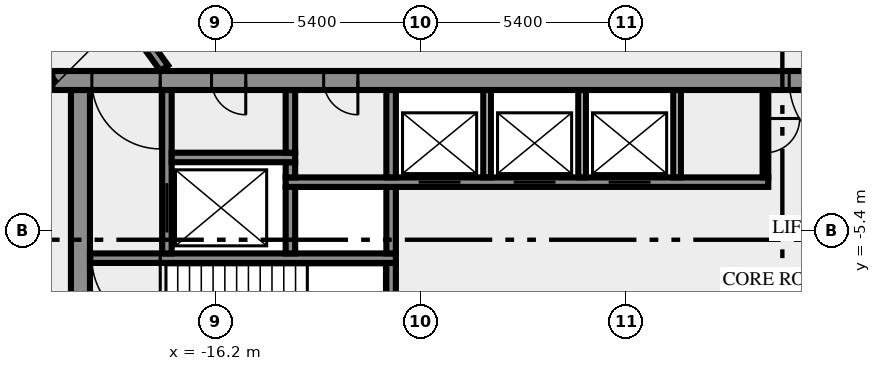
"""IFC4 building model, lengths in metres.
Left out: names, types, materials, properties, quantities, classifications, styles, units other than length and angle.
Written with IfcOpenShell. Run it as: python <this file> out.ifc"""

import sys

from ifc_helpers import new_model, si_unit, direction, frame, frame_2d, origin, place, context, subcontext, project, spatial, rectangle, extrude, element, fill, save


model = new_model("IFC4")
c1 = context("Model", 3, precision=1e-05, world=origin(), true_north=direction((0.0, 1.0)))
c2 = subcontext(c1, "Body", "Model", "MODEL_VIEW")
j1 = project(units=[si_unit("LENGTHUNIT", "METRE"), si_unit("PLANEANGLEUNIT", "RADIAN")], contexts=[c1])
p1 = place(None, origin())
s1 = spatial("IfcSite", under=j1, at=p1, CompositionType="ELEMENT")
p2 = place(p1, origin())
s2 = spatial("IfcBuilding", under=s1, at=p2, CompositionType="ELEMENT")
p3 = place(p2, frame((0.0, 0.0, 51.0)))
s3 = spatial("IfcBuildingStorey", under=s2, at=p3, CompositionType="ELEMENT", Elevation=51.0)
p4 = place(p3, frame((-19.75, -10.5, 0.0), z_axis=(0.0, 0.0, 1.0), x_axis=(0.0, 1.0, 0.0)))
e1 = element("IfcWall", 1, at=p4, inside=s3, PredefinedType="SHEAR", context=c2, shape_type="SweptSolid", body=[
    extrude(rectangle(XDim=8.8, YDim=0.5, at=frame_2d((4.4, 0.0))), origin(), (0.0, 0.0, 1.0), 3.65),
])
p5 = place(p3, frame((-11.575, -7.25, 0.0), z_axis=(0.0, 0.0, 1.0), x_axis=(0.0, 1.0, 0.0)))
e2 = element("IfcWall", 2, at=p5, inside=s3, PredefinedType="SHEAR", context=c2, shape_type="SweptSolid", body=[
    extrude(rectangle(XDim=1.0, YDim=0.25, at=frame_2d((0.5, 0.0))), origin(), (0.0, 0.0, 1.0), 3.65),
])
p6 = place(p3, frame((-11.45, -6.125, 0.0), z_axis=(0.0, 0.0, 1.0), x_axis=(-1.0, 0.0, 0.0)))
e3 = element("IfcWall", 3, at=p6, inside=s3, PredefinedType="SHEAR", context=c2, shape_type="SweptSolid", body=[
    extrude(rectangle(XDim=8.05, YDim=0.25, at=frame_2d((4.025, 0.0))), origin(), (0.0, 0.0, 1.0), 3.65),
])
p7 = place(p6, frame((6.2, 0.0, 0.0)))
e4 = element("IfcOpeningElement", 4, at=p7, cuts=e3, PredefinedType="OPENING", context=c2, shape_type="SweptSolid", body=[
    extrude(rectangle(XDim=1.8, YDim=2.1, at=frame_2d((0.9, 1.05))), frame((0.0, 0.135, 0.0), z_axis=(0.0, -1.0, 0.0), x_axis=(1.0, 0.0, 0.0)), (0.0, 0.0, 1.0), 0.27),
])
p8 = place(p3, frame((-17.475, -6.0, 0.0), z_axis=(0.0, 0.0, 1.0), x_axis=(0.0, 1.0, 0.0)))
e5 = element("IfcWall", 5, at=p8, inside=s3, PredefinedType="SHEAR", context=c2, shape_type="SweptSolid", body=[
    extrude(rectangle(XDim=4.3, YDim=0.25, at=frame_2d((2.15, 0.0))), origin(), (0.0, 0.0, 1.0), 3.65),
])
p9 = place(p8, frame((0.55, 0.0, 0.0)))
e6 = element("IfcOpeningElement", 6, at=p9, cuts=e5, PredefinedType="OPENING", context=c2, shape_type="SweptSolid", body=[
    extrude(rectangle(XDim=1.3, YDim=2.1, at=frame_2d((0.65, 1.05))), frame((0.0, 0.135, 0.0), z_axis=(0.0, -1.0, 0.0), x_axis=(1.0, 0.0, 0.0)), (0.0, 0.0, 1.0), 0.27),
])
for number, where, z_axis, x_axis in (
    (7, (-14.225, -6.0, 0.0), (0.0, 0.0, 1.0), (0.0, 1.0, 0.0)),
    (8, (-11.575, -6.0, 0.0), (0.0, 0.0, 1.0), (0.0, 1.0, 0.0)),
):
    element("IfcWall", number, at=place(p3, frame(where, z_axis=z_axis, x_axis=x_axis)), inside=s3, PredefinedType="SHEAR", context=c2, shape_type="SweptSolid", body=[
        extrude(rectangle(XDim=1.75, YDim=0.25, at=frame_2d((0.875, 0.0))), origin(), (0.0, 0.0, 1.0), 3.65),
    ])
p10 = place(p3, frame((-14.35, -4.125, 0.0), z_axis=(0.0, 0.0, 1.0), x_axis=(1.0, 0.0, 0.0)))
e9 = element("IfcWall", 9, at=p10, inside=s3, PredefinedType="SHEAR", context=c2, shape_type="SweptSolid", body=[
    extrude(rectangle(XDim=12.7, YDim=0.25, at=frame_2d((6.35, 0.0))), origin(), (0.0, 0.0, 1.0), 3.65),
])
p11 = place(p10, frame((3.5, 0.0, 0.0)))
e10 = element("IfcOpeningElement", 10, at=p11, cuts=e9, PredefinedType="OPENING", context=c2, shape_type="SweptSolid", body=[
    extrude(rectangle(XDim=1.1, YDim=2.1, at=frame_2d((0.55, 1.05))), frame((0.0, 0.135, 0.0), z_axis=(0.0, -1.0, 0.0), x_axis=(1.0, 0.0, 0.0)), (0.0, 0.0, 1.0), 0.27),
])
p12 = place(p10, frame((6.0, 0.0, 0.0)))
e11 = element("IfcOpeningElement", 11, at=p12, cuts=e9, PredefinedType="OPENING", context=c2, shape_type="SweptSolid", body=[
    extrude(rectangle(XDim=1.1, YDim=2.1, at=frame_2d((0.55, 1.05))), frame((0.0, 0.135, 0.0), z_axis=(0.0, -1.0, 0.0), x_axis=(1.0, 0.0, 0.0)), (0.0, 0.0, 1.0), 0.27),
])
p13 = place(p10, frame((8.5, 0.0, 0.0)))
e12 = element("IfcOpeningElement", 12, at=p13, cuts=e9, PredefinedType="OPENING", context=c2, shape_type="SweptSolid", body=[
    extrude(rectangle(XDim=1.1, YDim=2.1, at=frame_2d((0.55, 1.05))), frame((0.0, 0.135, 0.0), z_axis=(0.0, -1.0, 0.0), x_axis=(1.0, 0.0, 0.0)), (0.0, 0.0, 1.0), 0.27),
])
p14 = place(p3, frame((-14.225, -4.0, 0.0), z_axis=(0.0, 0.0, 1.0), x_axis=(0.0, 1.0, 0.0)))
e13 = element("IfcWall", 13, at=p14, inside=s3, PredefinedType="SHEAR", context=c2, shape_type="SweptSolid", body=[
    extrude(rectangle(XDim=0.4, YDim=0.25, at=frame_2d((0.2, 0.0))), origin(), (0.0, 0.0, 1.0), 3.65),
])
p15 = place(p3, frame((-11.575, -4.0, 0.0), z_axis=(0.0, 0.0, 1.0), x_axis=(0.0, 1.0, 0.0)))
e14 = element("IfcWall", 14, at=p15, inside=s3, PredefinedType="SHEAR", context=c2, shape_type="SweptSolid", body=[
    extrude(rectangle(XDim=2.3, YDim=0.25, at=frame_2d((1.15, 0.0))), origin(), (0.0, 0.0, 1.0), 3.65),
])
for number, where, z_axis, x_axis in (
    (15, (-9.05, -4.0, 0.0), (0.0, 0.0, 1.0), (0.0, 1.0, 0.0)),
    (16, (-6.55, -4.0, 0.0), (0.0, 0.0, 1.0), (0.0, 1.0, 0.0)),
    (17, (-4.05, -4.0, 0.0), (0.0, 0.0, 1.0), (0.0, 1.0, 0.0)),
):
    element("IfcWall", number, at=place(p3, frame(where, z_axis=z_axis, x_axis=x_axis)), inside=s3, PredefinedType="SOLIDWALL", context=c2, shape_type="SweptSolid", body=[
        extrude(rectangle(XDim=2.3, YDim=0.2, at=frame_2d((1.15, 0.0))), origin(), (0.0, 0.0, 1.0), 3.65),
    ])
p16 = place(p3, frame((-1.725, -1.7, 0.0), z_axis=(0.0, 0.0, 1.0), x_axis=(0.0, -1.0, 0.0)))
e18 = element("IfcWall", 18, at=p16, inside=s3, PredefinedType="PARTITIONING", context=c2, shape_type="SweptSolid", body=[
    extrude(rectangle(XDim=2.3, YDim=0.15, at=frame_2d((1.15, 0.0))), origin(), (0.0, 0.0, 1.0), 3.65),
])
p17 = place(p16, frame((0.75, 0.0, 0.0)))
e19 = element("IfcOpeningElement", 19, at=p17, cuts=e18, PredefinedType="OPENING", context=c2, shape_type="SweptSolid", body=[
    extrude(rectangle(XDim=0.9, YDim=2.1, at=frame_2d((0.45, 1.05))), frame((0.0, 0.085, 0.0), z_axis=(0.0, -1.0, 0.0), x_axis=(1.0, 0.0, 0.0)), (0.0, 0.0, 1.0), 0.17),
])
p18 = place(p3, frame((-17.35, -3.475, 0.0), z_axis=(0.0, 0.0, 1.0), x_axis=(1.0, 0.0, 0.0)))
e20 = element("IfcWall", 20, at=p18, inside=s3, PredefinedType="SHEAR", context=c2, shape_type="SweptSolid", body=[
    extrude(rectangle(XDim=3.25, YDim=0.25, at=frame_2d((1.625, 0.0))), origin(), (0.0, 0.0, 1.0), 3.65),
])
p19 = place(p3, frame((-14.225, -3.35, 0.0), z_axis=(0.0, 0.0, 1.0), x_axis=(0.0, 1.0, 0.0)))
e21 = element("IfcWall", 21, at=p19, inside=s3, PredefinedType="SHEAR", context=c2, shape_type="SweptSolid", body=[
    extrude(rectangle(XDim=1.65, YDim=0.25, at=frame_2d((0.825, 0.0))), origin(), (0.0, 0.0, 1.0), 3.65),
])
p20 = place(p3, frame((20.49, -1.45, 0.0), z_axis=(0.0, 0.0, 1.0), x_axis=(-1.0, 0.0, 0.0)))
e22 = element("IfcWall", 22, at=p20, inside=s3, PredefinedType="SHEAR", context=c2, shape_type="SweptSolid", body=[
    extrude(rectangle(XDim=40.98, YDim=0.5, at=frame_2d((20.49, 0.0))), origin(), (0.0, 0.0, 1.0), 3.65),
])
p21 = place(p20, frame((38.14, 0.0, 0.0)))
e23 = element("IfcOpeningElement", 23, at=p21, cuts=e22, PredefinedType="OPENING", context=c2, shape_type="SweptSolid", body=[
    extrude(rectangle(XDim=1.8, YDim=2.1, at=frame_2d((0.9, 1.05))), frame((0.0, 0.26, 0.0), z_axis=(0.0, -1.0, 0.0), x_axis=(1.0, 0.0, 0.0)), (0.0, 0.0, 1.0), 0.52),
])
p22 = place(p20, frame((35.89, 0.0, 0.0)))
e24 = element("IfcOpeningElement", 24, at=p22, cuts=e22, PredefinedType="OPENING", context=c2, shape_type="SweptSolid", body=[
    extrude(rectangle(XDim=0.9, YDim=2.1, at=frame_2d((0.45, 1.05))), frame((0.0, 0.26, 0.0), z_axis=(0.0, -1.0, 0.0), x_axis=(1.0, 0.0, 0.0)), (0.0, 0.0, 1.0), 0.52),
])
p23 = place(p20, frame((32.94, 0.0, 0.0)))
e25 = element("IfcOpeningElement", 25, at=p23, cuts=e22, PredefinedType="OPENING", context=c2, shape_type="SweptSolid", body=[
    extrude(rectangle(XDim=0.9, YDim=2.1, at=frame_2d((0.45, 1.05))), frame((0.0, 0.26, 0.0), z_axis=(0.0, -1.0, 0.0), x_axis=(1.0, 0.0, 0.0)), (0.0, 0.0, 1.0), 0.52),
])
p24 = place(p20, frame((19.59, 0.0, 0.0)))
e26 = element("IfcOpeningElement", 26, at=p24, cuts=e22, PredefinedType="OPENING", context=c2, shape_type="SweptSolid", body=[
    extrude(rectangle(XDim=2.0, YDim=2.1, at=frame_2d((1.0, 1.05))), frame((0.0, 0.26, 0.0), z_axis=(0.0, -1.0, 0.0), x_axis=(1.0, 0.0, 0.0)), (0.0, 0.0, 1.0), 0.52),
])
p25 = place(p20, frame((7.14, 0.0, 0.0)))
e27 = element("IfcOpeningElement", 27, at=p25, cuts=e22, PredefinedType="OPENING", context=c2, shape_type="SweptSolid", body=[
    extrude(rectangle(XDim=0.9, YDim=2.1, at=frame_2d((0.45, 1.05))), frame((0.0, 0.26, 0.0), z_axis=(0.0, -1.0, 0.0), x_axis=(1.0, 0.0, 0.0)), (0.0, 0.0, 1.0), 0.52),
])
p26 = place(p20, frame((5.028, 0.0, 0.0)))
e28 = element("IfcOpeningElement", 28, at=p26, cuts=e22, PredefinedType="OPENING", context=c2, shape_type="SweptSolid", body=[
    extrude(rectangle(XDim=0.8, YDim=2.1, at=frame_2d((0.4, 1.05))), frame((0.0, 0.26, 0.0), z_axis=(0.0, -1.0, 0.0), x_axis=(1.0, 0.0, 0.0)), (0.0, 0.0, 1.0), 0.52),
])
p27 = place(p20, frame((3.452, 0.0, 0.0)))
e29 = element("IfcOpeningElement", 29, at=p27, cuts=e22, PredefinedType="OPENING", context=c2, shape_type="SweptSolid", body=[
    extrude(rectangle(XDim=0.8, YDim=2.1, at=frame_2d((0.4, 1.05))), frame((0.0, 0.26, 0.0), z_axis=(0.0, -1.0, 0.0), x_axis=(1.0, 0.0, 0.0)), (0.0, 0.0, 1.0), 0.52),
])
p28 = place(p20, frame((1.04, 0.0, 0.0)))
e30 = element("IfcOpeningElement", 30, at=p28, cuts=e22, PredefinedType="OPENING", context=c2, shape_type="SweptSolid", body=[
    extrude(rectangle(XDim=1.8, YDim=2.1, at=frame_2d((0.9, 1.05))), frame((0.0, 0.26, 0.0), z_axis=(0.0, -1.0, 0.0), x_axis=(1.0, 0.0, 0.0)), (0.0, 0.0, 1.0), 0.52),
])
p29 = place(p3, frame((-20.531, -1.523, 0.0), z_axis=(0.0, 0.0, 1.0), x_axis=(-0.587784593204, 0.809017473231, 0.0)))
e31 = element("IfcWall", 31, at=p29, inside=s3, PredefinedType="SOLIDWALL", context=c2, shape_type="SweptSolid", body=[
    extrude(rectangle(XDim=44.67, YDim=0.25, at=frame_2d((22.335, 0.0))), origin(), (0.0, 0.0, 1.0), 3.65),
])
p30 = place(p29, frame((26.14, 0.0, 0.0)))
e32 = element("IfcOpeningElement", 32, at=p30, cuts=e31, PredefinedType="OPENING", context=c2, shape_type="SweptSolid", body=[
    extrude(rectangle(XDim=1.8, YDim=2.1, at=frame_2d((0.9, 1.05))), frame((0.0, 0.135, 0.0), z_axis=(0.0, -1.0, 0.0), x_axis=(1.0, 0.0, 0.0)), (0.0, 0.0, 1.0), 0.27),
])
p31 = place(p29, frame((43.296, 0.0, 0.0)))
e33 = element("IfcOpeningElement", 33, at=p31, cuts=e31, PredefinedType="OPENING", context=c2, shape_type="SweptSolid", body=[
    extrude(rectangle(XDim=0.9, YDim=2.1, at=frame_2d((0.45, 1.05))), frame((0.0, 0.135, 0.0), z_axis=(0.0, -1.0, 0.0), x_axis=(1.0, 0.0, 0.0)), (0.0, 0.0, 1.0), 0.27),
])
p32 = place(p29, frame((13.216, 0.0, 0.0)))
e34 = element("IfcOpeningElement", 34, at=p32, cuts=e31, PredefinedType="OPENING", context=c2, shape_type="SweptSolid", body=[
    extrude(rectangle(XDim=0.9, YDim=2.1, at=frame_2d((0.45, 1.05))), frame((0.0, 0.135, 0.0), z_axis=(0.0, -1.0, 0.0), x_axis=(1.0, 0.0, 0.0)), (0.0, 0.0, 1.0), 0.27),
])
p33 = place(p29, frame((7.816, 0.0, 0.0)))
e35 = element("IfcOpeningElement", 35, at=p33, cuts=e31, PredefinedType="OPENING", context=c2, shape_type="SweptSolid", body=[
    extrude(rectangle(XDim=0.9, YDim=2.1, at=frame_2d((0.45, 1.05))), frame((0.0, 0.135, 0.0), z_axis=(0.0, -1.0, 0.0), x_axis=(1.0, 0.0, 0.0)), (0.0, 0.0, 1.0), 0.27),
])
p34 = place(p29, frame((0.533, 0.0, 0.0)))
e36 = element("IfcOpeningElement", 36, at=p34, cuts=e31, PredefinedType="OPENING", context=c2, shape_type="SweptSolid", body=[
    extrude(rectangle(XDim=0.9, YDim=2.1, at=frame_2d((0.45, 1.05))), frame((0.0, 0.135, 0.0), z_axis=(0.0, -1.0, 0.0), x_axis=(1.0, 0.0, 0.0)), (0.0, 0.0, 1.0), 0.27),
])
p35 = place(p3, frame((-37.232, 25.972, 0.0), z_axis=(0.0, 0.0, 1.0), x_axis=(0.587786323093, -0.809016216391, 0.0)))
e37 = element("IfcWall", 37, at=p35, inside=s3, PredefinedType="SOLIDWALL", context=c2, shape_type="SweptSolid", body=[
    extrude(rectangle(XDim=33.493, YDim=0.25, at=frame_2d((16.747, 0.0))), origin(), (0.0, 0.0, 1.0), 3.65),
])
p36 = place(p35, frame((2.935, 0.0, 0.0)))
e38 = element("IfcOpeningElement", 38, at=p36, cuts=e37, PredefinedType="OPENING", context=c2, shape_type="SweptSolid", body=[
    extrude(rectangle(XDim=0.9, YDim=2.1, at=frame_2d((0.45, 1.05))), frame((0.0, 0.135, 0.0), z_axis=(0.0, -1.0, 0.0), x_axis=(1.0, 0.0, 0.0)), (0.0, 0.0, 1.0), 0.27),
])
p37 = place(p35, frame((16.435, 0.0, 0.0)))
e39 = element("IfcOpeningElement", 39, at=p37, cuts=e37, PredefinedType="OPENING", context=c2, shape_type="SweptSolid", body=[
    extrude(rectangle(XDim=0.9, YDim=2.1, at=frame_2d((0.45, 1.05))), frame((0.0, 0.135, 0.0), z_axis=(0.0, -1.0, 0.0), x_axis=(1.0, 0.0, 0.0)), (0.0, 0.0, 1.0), 0.27),
])
p38 = place(p35, frame((29.152, 0.0, 0.0)))
e40 = element("IfcOpeningElement", 40, at=p38, cuts=e37, PredefinedType="OPENING", context=c2, shape_type="SweptSolid", body=[
    extrude(rectangle(XDim=0.9, YDim=2.1, at=frame_2d((0.45, 1.05))), frame((0.0, 0.135, 0.0), z_axis=(0.0, -1.0, 0.0), x_axis=(1.0, 0.0, 0.0)), (0.0, 0.0, 1.0), 0.27),
])
p39 = place(p35, frame((14.536, 0.0, 0.0)))
e41 = element("IfcOpeningElement", 41, at=p39, cuts=e37, PredefinedType="OPENING", context=c2, shape_type="SweptSolid", body=[
    extrude(rectangle(XDim=1.2, YDim=2.1, at=frame_2d((0.6, 1.05))), frame((0.0, 0.135, 0.0), z_axis=(0.0, -1.0, 0.0), x_axis=(1.0, 0.0, 0.0)), (0.0, 0.0, 1.0), 0.27),
])
p40 = place(p35, frame((1.335, 0.0, 0.0)))
e42 = element("IfcOpeningElement", 42, at=p40, cuts=e37, PredefinedType="OPENING", context=c2, shape_type="SweptSolid", body=[
    extrude(rectangle(XDim=0.9, YDim=2.1, at=frame_2d((0.45, 1.05))), frame((0.0, 0.135, 0.0), z_axis=(0.0, -1.0, 0.0), x_axis=(1.0, 0.0, 0.0)), (0.0, 0.0, 1.0), 0.27),
])
p41 = place(p7, origin())
e43 = element("IfcDoor", 43, at=p41, inside=s3, OperationType="DOUBLE_DOOR_SINGLE_SWING", PredefinedType="DOOR", context=c2, shape_type="SweptSolid", body=[
    extrude(rectangle(XDim=1.8, YDim=2.1, at=frame_2d((0.9, 1.05))), frame((0.0, 0.025, 0.0), z_axis=(0.0, -1.0, 0.0), x_axis=(1.0, 0.0, 0.0)), (0.0, 0.0, 1.0), 0.05),
])
fill(e4, e43)
p42 = place(p9, origin())
e44 = element("IfcDoor", 44, at=p42, inside=s3, OperationType="DOUBLE_DOOR_SLIDING", PredefinedType="DOOR", context=c2, shape_type="SweptSolid", body=[
    extrude(rectangle(XDim=1.3, YDim=2.1, at=frame_2d((0.65, 1.05))), frame((0.0, 0.025, 0.0), z_axis=(0.0, -1.0, 0.0), x_axis=(1.0, 0.0, 0.0)), (0.0, 0.0, 1.0), 0.05),
])
fill(e6, e44)
p43 = place(p11, origin())
e45 = element("IfcDoor", 45, at=p43, inside=s3, OperationType="DOUBLE_DOOR_SLIDING", PredefinedType="DOOR", context=c2, shape_type="SweptSolid", body=[
    extrude(rectangle(XDim=1.1, YDim=2.1, at=frame_2d((0.55, 1.05))), frame((0.0, 0.025, 0.0), z_axis=(0.0, -1.0, 0.0), x_axis=(1.0, 0.0, 0.0)), (0.0, 0.0, 1.0), 0.05),
])
fill(e10, e45)
p44 = place(p12, origin())
e46 = element("IfcDoor", 46, at=p44, inside=s3, OperationType="DOUBLE_DOOR_SLIDING", PredefinedType="DOOR", context=c2, shape_type="SweptSolid", body=[
    extrude(rectangle(XDim=1.1, YDim=2.1, at=frame_2d((0.55, 1.05))), frame((0.0, 0.025, 0.0), z_axis=(0.0, -1.0, 0.0), x_axis=(1.0, 0.0, 0.0)), (0.0, 0.0, 1.0), 0.05),
])
fill(e11, e46)
p45 = place(p13, origin())
e47 = element("IfcDoor", 47, at=p45, inside=s3, OperationType="DOUBLE_DOOR_SLIDING", PredefinedType="DOOR", context=c2, shape_type="SweptSolid", body=[
    extrude(rectangle(XDim=1.1, YDim=2.1, at=frame_2d((0.55, 1.05))), frame((0.0, 0.025, 0.0), z_axis=(0.0, -1.0, 0.0), x_axis=(1.0, 0.0, 0.0)), (0.0, 0.0, 1.0), 0.05),
])
fill(e12, e47)
p46 = place(p17, origin())
e48 = element("IfcDoor", 48, at=p46, inside=s3, OperationType="SINGLE_SWING_RIGHT", PredefinedType="DOOR", context=c2, shape_type="SweptSolid", body=[
    extrude(rectangle(XDim=0.9, YDim=2.1, at=frame_2d((0.45, 1.05))), frame((0.0, 0.025, 0.0), z_axis=(0.0, -1.0, 0.0), x_axis=(1.0, 0.0, 0.0)), (0.0, 0.0, 1.0), 0.05),
])
fill(e19, e48)
p47 = place(p21, origin())
e49 = element("IfcDoor", 49, at=p47, inside=s3, OperationType="DOUBLE_DOOR_SINGLE_SWING", PredefinedType="DOOR", context=c2, shape_type="SweptSolid", body=[
    extrude(rectangle(XDim=1.8, YDim=2.1, at=frame_2d((0.9, 1.05))), frame((0.0, 0.025, 0.0), z_axis=(0.0, -1.0, 0.0), x_axis=(1.0, 0.0, 0.0)), (0.0, 0.0, 1.0), 0.05),
])
fill(e23, e49)
p48 = place(p22, origin())
e50 = element("IfcDoor", 50, at=p48, inside=s3, OperationType="SINGLE_SWING_RIGHT", PredefinedType="DOOR", context=c2, shape_type="SweptSolid", body=[
    extrude(rectangle(XDim=0.9, YDim=2.1, at=frame_2d((0.45, 1.05))), frame((0.0, 0.025, 0.0), z_axis=(0.0, -1.0, 0.0), x_axis=(1.0, 0.0, 0.0)), (0.0, 0.0, 1.0), 0.05),
])
fill(e24, e50)
p49 = place(p23, origin())
e51 = element("IfcDoor", 51, at=p49, inside=s3, OperationType="SINGLE_SWING_RIGHT", PredefinedType="DOOR", context=c2, shape_type="SweptSolid", body=[
    extrude(rectangle(XDim=0.9, YDim=2.1, at=frame_2d((0.45, 1.05))), frame((0.0, 0.025, 0.0), z_axis=(0.0, -1.0, 0.0), x_axis=(1.0, 0.0, 0.0)), (0.0, 0.0, 1.0), 0.05),
])
fill(e25, e51)
p50 = place(p24, origin())
e52 = element("IfcDoor", 52, at=p50, inside=s3, OperationType="DOUBLE_DOOR_SINGLE_SWING", PredefinedType="DOOR", context=c2, shape_type="SweptSolid", body=[
    extrude(rectangle(XDim=2.0, YDim=2.1, at=frame_2d((1.0, 1.05))), frame((0.0, 0.025, 0.0), z_axis=(0.0, -1.0, 0.0), x_axis=(1.0, 0.0, 0.0)), (0.0, 0.0, 1.0), 0.05),
])
fill(e26, e52)
save(model, sys.argv[1])
